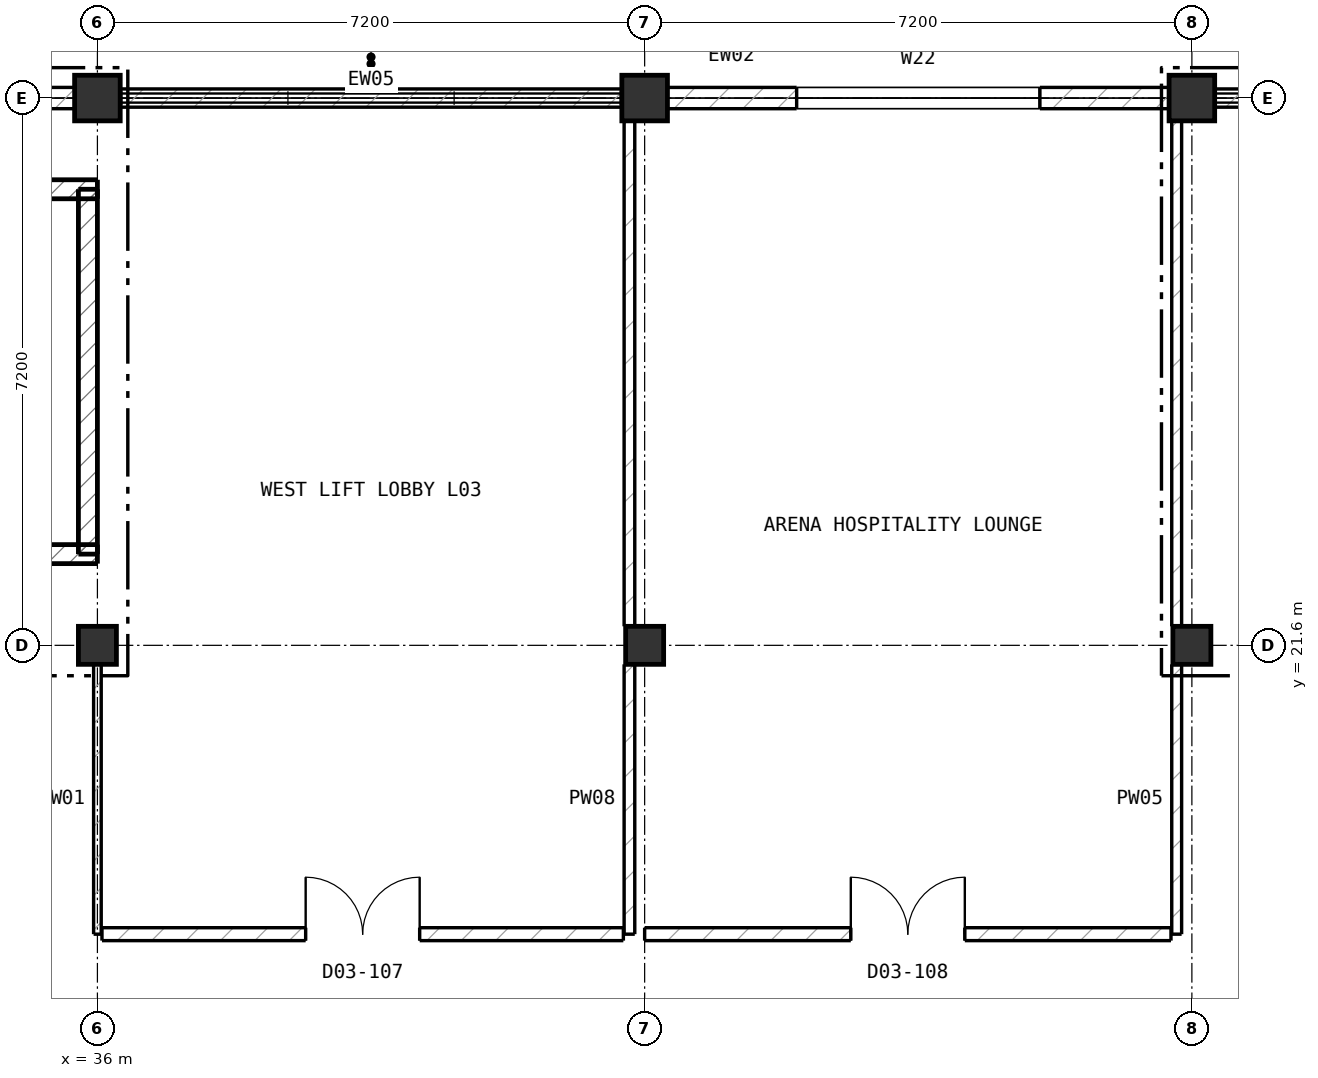
"""IFC4 building model, lengths in metres.
Left out: names, types, materials, properties, quantities, classifications, styles, units other than length and angle.
Written with IfcOpenShell. Run it as: python <this file> out.ifc"""

import sys

from ifc_helpers import new_model, si_unit, direction, frame, frame_2d, origin, origin_2d, place, context, subcontext, project, spatial, rectangle, extrude, element, fill, save


model = new_model("IFC4")
c1 = context("Model", 3, precision=1e-05, world=origin(), true_north=direction((0.0, 1.0)))
c2 = subcontext(c1, "Body", "Model", "MODEL_VIEW")
j1 = project(units=[si_unit("LENGTHUNIT", "METRE"), si_unit("PLANEANGLEUNIT", "RADIAN")], contexts=[c1])
p1 = place(None, origin())
s1 = spatial("IfcSite", under=j1, at=p1, CompositionType="ELEMENT")
p2 = place(p1, origin())
s2 = spatial("IfcBuilding", under=s1, at=p2, CompositionType="ELEMENT")
p3 = place(p2, frame((0.0, 0.0, 16.0)))
s3 = spatial("IfcBuildingStorey", under=s2, at=p3, CompositionType="ELEMENT", Elevation=16.0)
p4 = place(p3, frame((36.0, 21.6, 0.0), z_axis=(0.0, 0.0, 1.0), x_axis=(1.0, 0.0, 0.0)))
e1 = element("IfcColumn", 1, at=p4, inside=s3, PredefinedType="COLUMN", context=c2, shape_type="SweptSolid", body=[
    extrude(rectangle(XDim=0.5, YDim=0.5, at=origin_2d()), origin(), (0.0, 0.0, 1.0), 4.4),
])
p5 = place(p3, frame((36.0, 28.8, 0.0), z_axis=(0.0, 0.0, 1.0), x_axis=(1.0, 0.0, 0.0)))
e2 = element("IfcColumn", 2, at=p5, inside=s3, PredefinedType="COLUMN", context=c2, shape_type="SweptSolid", body=[
    extrude(rectangle(XDim=0.6, YDim=0.6, at=origin_2d()), origin(), (0.0, 0.0, 1.0), 4.4),
])
p6 = place(p3, frame((43.2, 21.6, 0.0), z_axis=(0.0, 0.0, 1.0), x_axis=(1.0, 0.0, 0.0)))
e3 = element("IfcColumn", 3, at=p6, inside=s3, PredefinedType="COLUMN", context=c2, shape_type="SweptSolid", body=[
    extrude(rectangle(XDim=0.5, YDim=0.5, at=origin_2d()), origin(), (0.0, 0.0, 1.0), 4.4),
])
p7 = place(p3, frame((43.2, 28.8, 0.0), z_axis=(0.0, 0.0, 1.0), x_axis=(1.0, 0.0, 0.0)))
e4 = element("IfcColumn", 4, at=p7, inside=s3, PredefinedType="COLUMN", context=c2, shape_type="SweptSolid", body=[
    extrude(rectangle(XDim=0.6, YDim=0.6, at=origin_2d()), origin(), (0.0, 0.0, 1.0), 4.4),
])
p8 = place(p3, frame((50.4, 21.6, 0.0), z_axis=(0.0, 0.0, 1.0), x_axis=(1.0, 0.0, 0.0)))
e5 = element("IfcColumn", 5, at=p8, inside=s3, PredefinedType="COLUMN", context=c2, shape_type="SweptSolid", body=[
    extrude(rectangle(XDim=0.5, YDim=0.5, at=origin_2d()), origin(), (0.0, 0.0, 1.0), 4.4),
])
p9 = place(p3, frame((50.4, 28.8, 0.0), z_axis=(0.0, 0.0, 1.0), x_axis=(1.0, 0.0, 0.0)))
e6 = element("IfcColumn", 6, at=p9, inside=s3, PredefinedType="COLUMN", context=c2, shape_type="SweptSolid", body=[
    extrude(rectangle(XDim=0.6, YDim=0.6, at=origin_2d()), origin(), (0.0, 0.0, 1.0), 4.4),
])
p10 = place(p3, frame((29.035, 28.8, 0.0), z_axis=(0.0, 0.0, 1.0), x_axis=(1.0, 0.0, 0.0)))
e7 = element("IfcWall", 7, at=p10, inside=s3, PredefinedType="SOLIDWALL", context=c2, shape_type="SweptSolid", body=[
    extrude(rectangle(XDim=6.68, YDim=0.28, at=frame_2d((3.34, 0.0))), origin(), (0.0, 0.0, 1.0), 4.12),
])
p11 = place(p10, frame((1.74, 0.0, 2.15)))
e8 = element("IfcOpeningElement", 8, at=p11, cuts=e7, PredefinedType="OPENING", context=c2, shape_type="SweptSolid", body=[
    extrude(rectangle(XDim=3.2, YDim=1.2, at=frame_2d((1.6, 0.6))), frame((0.0, 0.15, 0.0), z_axis=(0.0, -1.0, 0.0), x_axis=(1.0, 0.0, 0.0)), (0.0, 0.0, 1.0), 0.3),
])
p12 = place(p3, frame((36.285, 28.8, 0.0), z_axis=(0.0, 0.0, 1.0), x_axis=(1.0, 0.0, 0.0)))
e9 = element("IfcWall", 9, at=p12, inside=s3, PredefinedType="SOLIDWALL", context=c2, shape_type="SweptSolid", body=[
    extrude(rectangle(XDim=6.63, YDim=0.24, at=frame_2d((3.315, 0.0))), origin(), (0.0, 0.0, 1.0), 0.9),
])
p13 = place(p3, frame((43.485, 28.8, 0.0), z_axis=(0.0, 0.0, 1.0), x_axis=(1.0, 0.0, 0.0)))
e10 = element("IfcWall", 10, at=p13, inside=s3, PredefinedType="SOLIDWALL", context=c2, shape_type="SweptSolid", body=[
    extrude(rectangle(XDim=6.63, YDim=0.28, at=frame_2d((3.315, 0.0))), origin(), (0.0, 0.0, 1.0), 4.12),
])
p14 = place(p13, frame((1.715, 0.0, 2.15)))
e11 = element("IfcOpeningElement", 11, at=p14, cuts=e10, PredefinedType="OPENING", context=c2, shape_type="SweptSolid", body=[
    extrude(rectangle(XDim=3.2, YDim=1.2, at=frame_2d((1.6, 0.6))), frame((0.0, 0.15, 0.0), z_axis=(0.0, -1.0, 0.0), x_axis=(1.0, 0.0, 0.0)), (0.0, 0.0, 1.0), 0.3),
])
p15 = place(p3, frame((50.685, 28.8, 0.0), z_axis=(0.0, 0.0, 1.0), x_axis=(1.0, 0.0, 0.0)))
e12 = element("IfcWall", 12, at=p15, inside=s3, PredefinedType="SOLIDWALL", context=c2, shape_type="SweptSolid", body=[
    extrude(rectangle(XDim=6.63, YDim=0.24, at=frame_2d((3.315, 0.0))), origin(), (0.0, 0.0, 1.0), 0.9),
])
p16 = place(p3, frame((28.35, 27.6, 0.0), z_axis=(0.0, 0.0, 1.0), x_axis=(1.0, 0.0, 0.0)))
e13 = element("IfcWall", 13, at=p16, inside=s3, PredefinedType="SHEAR", context=c2, shape_type="SweptSolid", body=[
    extrude(rectangle(XDim=7.65, YDim=0.25, at=frame_2d((3.825, 0.0))), origin(), (0.0, 0.0, 1.0), 4.4),
])
p17 = place(p3, frame((35.875, 27.6, 0.0), z_axis=(0.0, 0.0, 1.0), x_axis=(0.0, -1.0, 0.0)))
e14 = element("IfcWall", 14, at=p17, inside=s3, PredefinedType="SHEAR", context=c2, shape_type="SweptSolid", body=[
    extrude(rectangle(XDim=4.8, YDim=0.25, at=frame_2d((2.4, 0.0))), origin(), (0.0, 0.0, 1.0), 4.4),
])
p18 = place(p3, frame((36.0, 22.8, 0.0), z_axis=(0.0, 0.0, 1.0), x_axis=(-1.0, 0.0, 0.0)))
e15 = element("IfcWall", 15, at=p18, inside=s3, PredefinedType="SHEAR", context=c2, shape_type="SweptSolid", body=[
    extrude(rectangle(XDim=7.65, YDim=0.25, at=frame_2d((3.825, 0.0))), origin(), (0.0, 0.0, 1.0), 4.4),
])
p19 = place(p3, frame((36.0, 17.8, 0.0), z_axis=(0.0, 0.0, 1.0), x_axis=(0.0, 1.0, 0.0)))
e16 = element("IfcWall", 16, at=p19, inside=s3, PredefinedType="PARTITIONING", context=c2, shape_type="SweptSolid", body=[
    extrude(rectangle(XDim=3.55, YDim=0.1, at=frame_2d((1.775, 0.0))), origin(), (0.0, 0.0, 1.0), 3.61),
])
p20 = place(p3, frame((43.0, 17.8, 0.0), z_axis=(0.0, 0.0, 1.0), x_axis=(0.0, 1.0, 0.0)))
e17 = element("IfcWall", 17, at=p20, inside=s3, PredefinedType="PARTITIONING", context=c2, shape_type="SweptSolid", body=[
    extrude(rectangle(XDim=3.55, YDim=0.14, at=frame_2d((1.775, 0.0))), origin(), (0.0, 0.0, 1.0), 4.11),
])
p21 = place(p3, frame((43.0, 21.85, 0.0), z_axis=(0.0, 0.0, 1.0), x_axis=(0.0, 1.0, 0.0)))
e18 = element("IfcWall", 18, at=p21, inside=s3, PredefinedType="PARTITIONING", context=c2, shape_type="SweptSolid", body=[
    extrude(rectangle(XDim=6.65, YDim=0.14, at=frame_2d((3.325, 0.0))), origin(), (0.0, 0.0, 1.0), 4.12),
])
p22 = place(p3, frame((50.2, 17.8, 0.0), z_axis=(0.0, 0.0, 1.0), x_axis=(0.0, 1.0, 0.0)))
e19 = element("IfcWall", 19, at=p22, inside=s3, PredefinedType="PARTITIONING", context=c2, shape_type="SweptSolid", body=[
    extrude(rectangle(XDim=3.55, YDim=0.13, at=frame_2d((1.775, 0.0))), origin(), (0.0, 0.0, 1.0), 4.11),
])
p23 = place(p3, frame((50.2, 21.85, 0.0), z_axis=(0.0, 0.0, 1.0), x_axis=(0.0, 1.0, 0.0)))
e20 = element("IfcWall", 20, at=p23, inside=s3, PredefinedType="PARTITIONING", context=c2, shape_type="SweptSolid", body=[
    extrude(rectangle(XDim=6.65, YDim=0.13, at=frame_2d((3.325, 0.0))), origin(), (0.0, 0.0, 1.0), 4.12),
])
p24 = place(p3, frame((36.06, 17.8, 0.0), z_axis=(0.0, 0.0, 1.0), x_axis=(1.0, 0.0, 0.0)))
e21 = element("IfcWall", 21, at=p24, inside=s3, PredefinedType="PARTITIONING", context=c2, shape_type="SweptSolid", body=[
    extrude(rectangle(XDim=6.86, YDim=0.17, at=frame_2d((3.43, 0.0))), origin(), (0.0, 0.0, 1.0), 4.11),
])
p25 = place(p24, frame((2.68, 0.0, 0.0)))
e22 = element("IfcOpeningElement", 22, at=p25, cuts=e21, PredefinedType="OPENING", context=c2, shape_type="SweptSolid", body=[
    extrude(rectangle(XDim=1.5, YDim=2.2, at=frame_2d((0.75, 1.1))), frame((0.0, 0.095, 0.0), z_axis=(0.0, -1.0, 0.0), x_axis=(1.0, 0.0, 0.0)), (0.0, 0.0, 1.0), 0.19),
])
p26 = place(p3, frame((43.2, 17.8, 0.0), z_axis=(0.0, 0.0, 1.0), x_axis=(1.0, 0.0, 0.0)))
e23 = element("IfcWall", 23, at=p26, inside=s3, PredefinedType="PARTITIONING", context=c2, shape_type="SweptSolid", body=[
    extrude(rectangle(XDim=6.925, YDim=0.17, at=frame_2d((3.462, 0.0))), origin(), (0.0, 0.0, 1.0), 4.11),
])
p27 = place(p26, frame((2.712, 0.0, 0.0)))
e24 = element("IfcOpeningElement", 24, at=p27, cuts=e23, PredefinedType="OPENING", context=c2, shape_type="SweptSolid", body=[
    extrude(rectangle(XDim=1.5, YDim=2.2, at=frame_2d((0.75, 1.1))), frame((0.0, 0.095, 0.0), z_axis=(0.0, -1.0, 0.0), x_axis=(1.0, 0.0, 0.0)), (0.0, 0.0, 1.0), 0.19),
])
p28 = place(p14, origin())
e25 = element("IfcWindow", 25, at=p28, inside=s3, PartitioningType="SINGLE_PANEL", PredefinedType="WINDOW", context=c2, shape_type="SweptSolid", body=[
    extrude(rectangle(XDim=3.2, YDim=1.2, at=frame_2d((1.6, 0.6))), frame((0.0, 0.03, 0.0), z_axis=(0.0, -1.0, 0.0), x_axis=(1.0, 0.0, 0.0)), (0.0, 0.0, 1.0), 0.06),
])
fill(e11, e25)
p29 = place(p25, origin())
e26 = element("IfcDoor", 26, at=p29, inside=s3, OperationType="DOUBLE_DOOR_SINGLE_SWING", PredefinedType="DOOR", context=c2, shape_type="SweptSolid", body=[
    extrude(rectangle(XDim=1.5, YDim=2.2, at=frame_2d((0.75, 1.1))), frame((0.0, 0.025, 0.0), z_axis=(0.0, -1.0, 0.0), x_axis=(1.0, 0.0, 0.0)), (0.0, 0.0, 1.0), 0.05),
])
fill(e22, e26)
p30 = place(p27, origin())
e27 = element("IfcDoor", 27, at=p30, inside=s3, OperationType="DOUBLE_DOOR_SINGLE_SWING", PredefinedType="DOOR", context=c2, shape_type="SweptSolid", body=[
    extrude(rectangle(XDim=1.5, YDim=2.2, at=frame_2d((0.75, 1.1))), frame((0.0, 0.025, 0.0), z_axis=(0.0, -1.0, 0.0), x_axis=(1.0, 0.0, 0.0)), (0.0, 0.0, 1.0), 0.05),
])
fill(e24, e27)
save(model, sys.argv[1])
